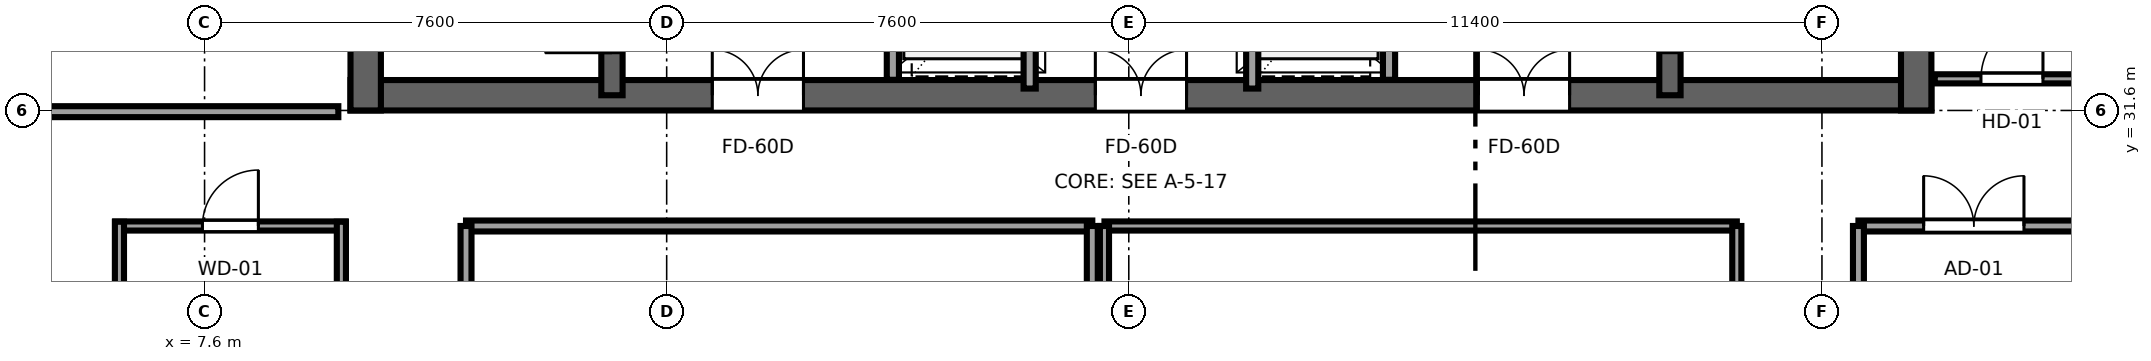
"""IFC4 building model, lengths in metres.
Left out: names, types, materials, properties, quantities, classifications, styles, units other than length and angle.
Written with IfcOpenShell. Run it as: python <this file> out.ifc"""

import sys

from ifc_helpers import new_model, si_unit, direction, frame, frame_2d, origin, place, context, subcontext, project, spatial, rectangle, extrude, source, transform, mapped, element, fill, save


model = new_model("IFC4")
c1 = context("Model", 3, precision=1e-05, world=origin(), true_north=direction((0.0, 1.0)))
c2 = subcontext(c1, "Body", "Model", "MODEL_VIEW")
j1 = project(units=[si_unit("LENGTHUNIT", "METRE"), si_unit("PLANEANGLEUNIT", "RADIAN")], contexts=[c1])
p1 = place(None, origin())
s1 = spatial("IfcSite", under=j1, at=p1, CompositionType="ELEMENT")
p2 = place(p1, origin())
s2 = spatial("IfcBuilding", under=s1, at=p2, CompositionType="ELEMENT")
p3 = place(p2, frame((0.0, 0.0, 245.2)))
s3 = spatial("IfcBuildingStorey", under=s2, at=p3, CompositionType="ELEMENT", Elevation=245.2)
p4 = place(p3, frame((10.0, 31.85, 0.0), z_axis=(0.0, 0.0, 1.0), x_axis=(1.0, 0.0, 0.0)))
e1 = element("IfcWall", 1, at=p4, inside=s3, PredefinedType="SHEAR", context=c2, shape_type="SweptSolid", body=[
    extrude(rectangle(XDim=26.0, YDim=0.5, at=frame_2d((13.0, 0.0))), origin(), (0.0, 0.0, 1.0), 3.55),
])
p5 = place(p4, frame((7.45, 0.0, 0.0), z_axis=(0.0, 0.0, 1.0), x_axis=(-1.0, 0.0, 0.0)))
e2 = element("IfcOpeningElement", 2, at=p5, cuts=e1, PredefinedType="OPENING", context=c2, shape_type="SweptSolid", body=[
    extrude(rectangle(XDim=1.5, YDim=2.04, at=frame_2d((0.75, 1.02))), frame((0.0, 0.26, 0.0), z_axis=(0.0, -1.0, 0.0), x_axis=(1.0, 0.0, 0.0)), (0.0, 0.0, 1.0), 0.52),
])
p6 = place(p4, frame((13.75, 0.0, 0.0), z_axis=(0.0, 0.0, 1.0), x_axis=(-1.0, 0.0, 0.0)))
e3 = element("IfcOpeningElement", 3, at=p6, cuts=e1, PredefinedType="OPENING", context=c2, shape_type="SweptSolid", body=[
    extrude(rectangle(XDim=1.5, YDim=2.04, at=frame_2d((0.75, 1.02))), frame((0.0, 0.26, 0.0), z_axis=(0.0, -1.0, 0.0), x_axis=(1.0, 0.0, 0.0)), (0.0, 0.0, 1.0), 0.52),
])
p7 = place(p4, frame((20.05, 0.0, 0.0), z_axis=(0.0, 0.0, 1.0), x_axis=(-1.0, 0.0, 0.0)))
e4 = element("IfcOpeningElement", 4, at=p7, cuts=e1, PredefinedType="OPENING", context=c2, shape_type="SweptSolid", body=[
    extrude(rectangle(XDim=1.5, YDim=2.04, at=frame_2d((0.75, 1.02))), frame((0.0, 0.26, 0.0), z_axis=(0.0, -1.0, 0.0), x_axis=(1.0, 0.0, 0.0)), (0.0, 0.0, 1.0), 0.52),
])
for number, where, z_axis, x_axis in (
    (5, (10.25, 31.6, 0.0), (0.0, 0.0, 1.0), (0.0, 1.0, 0.0)),
    (6, (35.75, 31.6, 0.0), (0.0, 0.0, 1.0), (0.0, 1.0, 0.0)),
):
    element("IfcWall", number, at=place(p3, frame(where, z_axis=z_axis, x_axis=x_axis)), inside=s3, PredefinedType="SHEAR", context=c2, shape_type="SweptSolid", body=[
        extrude(rectangle(XDim=13.6, YDim=0.5, at=frame_2d((6.8, 0.0))), origin(), (0.0, 0.0, 1.0), 3.55),
    ])
p8 = place(p3, frame((14.3, 31.85, 0.0), z_axis=(0.0, 0.0, 1.0), x_axis=(0.0, 1.0, 0.0)))
e7 = element("IfcWall", 7, at=p8, inside=s3, PredefinedType="SHEAR", context=c2, shape_type="SweptSolid", body=[
    extrude(rectangle(XDim=13.1, YDim=0.35, at=frame_2d((6.55, 0.0))), origin(), (0.0, 0.0, 1.0), 3.55),
])
p9 = place(p8, frame((0.7, 0.0, 0.0)))
e8 = element("IfcOpeningElement", 8, at=p9, cuts=e7, PredefinedType="OPENING", context=c2, shape_type="SweptSolid", body=[
    extrude(rectangle(XDim=1.1, YDim=2.12, at=frame_2d((0.55, 1.06))), frame((0.0, 0.185, 0.0), z_axis=(0.0, -1.0, 0.0), x_axis=(1.0, 0.0, 0.0)), (0.0, 0.0, 1.0), 0.37),
])
p10 = place(p3, frame((31.7, 31.85, 0.0), z_axis=(0.0, 0.0, 1.0), x_axis=(0.0, 1.0, 0.0)))
e9 = element("IfcWall", 9, at=p10, inside=s3, PredefinedType="SHEAR", context=c2, shape_type="SweptSolid", body=[
    extrude(rectangle(XDim=13.1, YDim=0.35, at=frame_2d((6.55, 0.0))), origin(), (0.0, 0.0, 1.0), 3.55),
])
p11 = place(p10, frame((1.8, 0.0, 0.0), z_axis=(0.0, 0.0, 1.0), x_axis=(-1.0, 0.0, 0.0)))
e10 = element("IfcOpeningElement", 10, at=p11, cuts=e9, PredefinedType="OPENING", context=c2, shape_type="SweptSolid", body=[
    extrude(rectangle(XDim=1.1, YDim=2.12, at=frame_2d((0.55, 1.06))), frame((0.0, 0.185, 0.0), z_axis=(0.0, -1.0, 0.0), x_axis=(1.0, 0.0, 0.0)), (0.0, 0.0, 1.0), 0.37),
])
for number, where, z_axis, x_axis in (
    (11, (18.92, 32.104, 0.0), (0.0, 0.0, 1.0), (0.0, 1.0, 0.0)),
    (12, (27.08, 32.104, 0.0), (0.0, 0.0, 1.0), (0.0, 1.0, 0.0)),
):
    element("IfcWall", number, at=place(p3, frame(where, z_axis=z_axis, x_axis=x_axis)), inside=s3, PredefinedType="SOLIDWALL", context=c2, shape_type="SweptSolid", body=[
        extrude(rectangle(XDim=4.046, YDim=0.2, at=frame_2d((2.023, 0.0))), origin(), (0.0, 0.0, 1.0), 3.37),
    ])
p12 = place(p3, frame((21.17, 31.96, 0.0), z_axis=(0.0, 0.0, 1.0), x_axis=(0.0, 1.0, 0.0)))
e13 = element("IfcWall", 13, at=p12, inside=s3, PredefinedType="SOLIDWALL", context=c2, shape_type="SweptSolid", body=[
    extrude(rectangle(XDim=5.08, YDim=0.2, at=frame_2d((2.54, 0.0))), origin(), (0.0, 0.0, 1.0), 3.37),
])
p13 = place(p12, frame((0.74, 0.0, 0.0)))
e14 = element("IfcOpeningElement", 14, at=p13, cuts=e13, PredefinedType="OPENING", context=c2, shape_type="SweptSolid", body=[
    extrude(rectangle(XDim=1.1, YDim=2.12, at=frame_2d((0.55, 1.06))), frame((0.0, 0.11, 0.0), z_axis=(0.0, -1.0, 0.0), x_axis=(1.0, 0.0, 0.0)), (0.0, 0.0, 1.0), 0.22),
])
p14 = place(p12, frame((3.24, 0.0, 0.0)))
e15 = element("IfcOpeningElement", 15, at=p14, cuts=e13, PredefinedType="OPENING", context=c2, shape_type="SweptSolid", body=[
    extrude(rectangle(XDim=1.1, YDim=2.12, at=frame_2d((0.55, 1.06))), frame((0.0, 0.11, 0.0), z_axis=(0.0, -1.0, 0.0), x_axis=(1.0, 0.0, 0.0)), (0.0, 0.0, 1.0), 0.22),
])
p15 = place(p3, frame((24.83, 31.96, 0.0), z_axis=(0.0, 0.0, 1.0), x_axis=(0.0, 1.0, 0.0)))
e16 = element("IfcWall", 16, at=p15, inside=s3, PredefinedType="SOLIDWALL", context=c2, shape_type="SweptSolid", body=[
    extrude(rectangle(XDim=5.08, YDim=0.2, at=frame_2d((2.54, 0.0))), origin(), (0.0, 0.0, 1.0), 3.37),
])
p16 = place(p15, frame((0.74, 0.0, 0.0)))
e17 = element("IfcOpeningElement", 17, at=p16, cuts=e16, PredefinedType="OPENING", context=c2, shape_type="SweptSolid", body=[
    extrude(rectangle(XDim=1.1, YDim=2.12, at=frame_2d((0.55, 1.06))), frame((0.0, 0.11, 0.0), z_axis=(0.0, -1.0, 0.0), x_axis=(1.0, 0.0, 0.0)), (0.0, 0.0, 1.0), 0.22),
])
p17 = place(p15, frame((3.24, 0.0, 0.0)))
e18 = element("IfcOpeningElement", 18, at=p17, cuts=e16, PredefinedType="OPENING", context=c2, shape_type="SweptSolid", body=[
    extrude(rectangle(XDim=1.1, YDim=2.12, at=frame_2d((0.55, 1.06))), frame((0.0, 0.11, 0.0), z_axis=(0.0, -1.0, 0.0), x_axis=(1.0, 0.0, 0.0)), (0.0, 0.0, 1.0), 0.22),
])
p18 = place(p3, frame((11.9, 29.7, 0.0), z_axis=(0.0, 0.0, 1.0), x_axis=(1.0, 0.0, 0.0)))
e19 = element("IfcWall", 19, at=p18, inside=s3, PredefinedType="PARTITIONING", context=c2, shape_type="SweptSolid", body=[
    extrude(rectangle(XDim=10.3, YDim=0.18, at=frame_2d((5.15, 0.0))), origin(), (0.0, 0.0, 1.0), 3.37),
])
p19 = place(p3, frame((11.9, 21.55, 0.0), z_axis=(0.0, 0.0, 1.0), x_axis=(0.0, 1.0, 0.0)))
e20 = element("IfcWall", 20, at=p19, inside=s3, PredefinedType="PARTITIONING", context=c2, shape_type="SweptSolid", body=[
    extrude(rectangle(XDim=8.15, YDim=0.18, at=frame_2d((4.075, 0.0))), origin(), (0.0, 0.0, 1.0), 3.37),
])
p20 = place(p3, frame((22.2, 21.55, 0.0), z_axis=(0.0, 0.0, 1.0), x_axis=(0.0, 1.0, 0.0)))
e21 = element("IfcWall", 21, at=p20, inside=s3, PredefinedType="PARTITIONING", context=c2, shape_type="SweptSolid", body=[
    extrude(rectangle(XDim=8.15, YDim=0.18, at=frame_2d((4.075, 0.0))), origin(), (0.0, 0.0, 1.0), 2.827),
])
p21 = place(p3, frame((22.4, 29.7, 0.0), z_axis=(0.0, 0.0, 1.0), x_axis=(1.0, 0.0, 0.0)))
e22 = element("IfcWall", 22, at=p21, inside=s3, PredefinedType="PARTITIONING", context=c2, shape_type="SweptSolid", body=[
    extrude(rectangle(XDim=10.4, YDim=0.15, at=frame_2d((5.2, 0.0))), origin(), (0.0, 0.0, 1.0), 3.37),
])
p22 = place(p3, frame((22.4, 21.55, 0.0), z_axis=(0.0, 0.0, 1.0), x_axis=(0.0, 1.0, 0.0)))
e23 = element("IfcWall", 23, at=p22, inside=s3, PredefinedType="PARTITIONING", context=c2, shape_type="SweptSolid", body=[
    extrude(rectangle(XDim=8.15, YDim=0.15, at=frame_2d((4.075, 0.0))), origin(), (0.0, 0.0, 1.0), 3.37),
])
p23 = place(p3, frame((32.8, 21.55, 0.0), z_axis=(0.0, 0.0, 1.0), x_axis=(0.0, 1.0, 0.0)))
e24 = element("IfcWall", 24, at=p23, inside=s3, PredefinedType="PARTITIONING", context=c2, shape_type="SweptSolid", body=[
    extrude(rectangle(XDim=8.15, YDim=0.15, at=frame_2d((4.075, 0.0))), origin(), (0.0, 0.0, 1.0), 2.827),
])
p24 = place(p3, frame((6.13, 29.7, 0.0), z_axis=(0.0, 0.0, 1.0), x_axis=(1.0, 0.0, 0.0)))
e25 = element("IfcWall", 25, at=p24, inside=s3, PredefinedType="PARTITIONING", context=c2, shape_type="SweptSolid", body=[
    extrude(rectangle(XDim=3.79, YDim=0.15, at=frame_2d((1.895, 0.0))), origin(), (0.0, 0.0, 1.0), 3.37),
])
p25 = place(p24, frame((1.435, 0.0, 0.0)))
e26 = element("IfcOpeningElement", 26, at=p25, cuts=e25, PredefinedType="OPENING", context=c2, shape_type="SweptSolid", body=[
    extrude(rectangle(XDim=0.92, YDim=2.01, at=frame_2d((0.46, 1.005))), frame((0.0, 0.085, 0.0), z_axis=(0.0, -1.0, 0.0), x_axis=(1.0, 0.0, 0.0)), (0.0, 0.0, 1.0), 0.17),
])
for number, where, z_axis, x_axis in (
    (27, (6.2, 26.43, 0.0), (0.0, 0.0, 1.0), (0.0, 1.0, 0.0)),
    (28, (9.85, 26.43, 0.0), (0.0, 0.0, 1.0), (0.0, 1.0, 0.0)),
):
    element("IfcWall", number, at=place(p3, frame(where, z_axis=z_axis, x_axis=x_axis)), inside=s3, PredefinedType="PARTITIONING", context=c2, shape_type="SweptSolid", body=[
        extrude(rectangle(XDim=3.34, YDim=0.15, at=frame_2d((1.67, 0.0))), origin(), (0.0, 0.0, 1.0), 3.37),
    ])
p26 = place(p3, frame((3.005, 31.58, 0.0), z_axis=(0.0, 0.0, 1.0), x_axis=(1.0, 0.0, 0.0)))
e29 = element("IfcWall", 29, at=p26, inside=s3, PredefinedType="PARTITIONING", context=c2, shape_type="SweptSolid", body=[
    extrude(rectangle(XDim=6.795, YDim=0.18, at=frame_2d((3.397, 0.0))), origin(), (0.0, 0.0, 1.0), 3.37),
])
p27 = place(p26, frame((0.285, 0.0, 0.0)))
e30 = element("IfcOpeningElement", 30, at=p27, cuts=e29, PredefinedType="OPENING", context=c2, shape_type="SweptSolid", body=[
    extrude(rectangle(XDim=0.98, YDim=2.12, at=frame_2d((0.49, 1.06))), frame((0.0, 0.1, 0.0), z_axis=(0.0, -1.0, 0.0), x_axis=(1.0, 0.0, 0.0)), (0.0, 0.0, 1.0), 0.2),
])
p28 = place(p3, frame((36.055, 32.12, 0.0), z_axis=(0.0, 0.0, 1.0), x_axis=(1.0, 0.0, 0.0)))
e31 = element("IfcWall", 31, at=p28, inside=s3, PredefinedType="PARTITIONING", context=c2, shape_type="SweptSolid", body=[
    extrude(rectangle(XDim=2.54, YDim=0.15, at=frame_2d((1.27, 0.0))), origin(), (0.0, 0.0, 1.0), 3.37),
])
p29 = place(p28, frame((0.76, 0.0, 0.0)))
e32 = element("IfcOpeningElement", 32, at=p29, cuts=e31, PredefinedType="OPENING", context=c2, shape_type="SweptSolid", body=[
    extrude(rectangle(XDim=1.02, YDim=2.03, at=frame_2d((0.51, 1.015))), frame((0.0, 0.085, 0.0), z_axis=(0.0, -1.0, 0.0), x_axis=(1.0, 0.0, 0.0)), (0.0, 0.0, 1.0), 0.17),
])
p30 = place(p3, frame((34.8, 29.7, 0.0), z_axis=(0.0, 0.0, 1.0), x_axis=(1.0, 0.0, 0.0)))
e33 = element("IfcWall", 33, at=p30, inside=s3, PredefinedType="PARTITIONING", context=c2, shape_type="SweptSolid", body=[
    extrude(rectangle(XDim=3.795, YDim=0.18, at=frame_2d((1.897, 0.0))), origin(), (0.0, 0.0, 1.0), 3.37),
])
p31 = place(p30, frame((1.073, 0.0, 0.0)))
e34 = element("IfcOpeningElement", 34, at=p31, cuts=e33, PredefinedType="OPENING", context=c2, shape_type="SweptSolid", body=[
    extrude(rectangle(XDim=1.65, YDim=2.15, at=frame_2d((0.825, 1.075))), frame((0.0, 0.1, 0.0), z_axis=(0.0, -1.0, 0.0), x_axis=(1.0, 0.0, 0.0)), (0.0, 0.0, 1.0), 0.2),
])
p32 = place(p3, frame((34.8, 21.9, 0.0), z_axis=(0.0, 0.0, 1.0), x_axis=(0.0, 1.0, 0.0)))
e35 = element("IfcWall", 35, at=p32, inside=s3, PredefinedType="PARTITIONING", context=c2, shape_type="SweptSolid", body=[
    extrude(rectangle(XDim=7.8, YDim=0.18, at=frame_2d((3.9, 0.0))), origin(), (0.0, 0.0, 1.0), 2.827),
])
m1 = source(origin(), c2, "Body", "SweptSolid", [
    extrude(rectangle(XDim=1.1, YDim=2.12, at=frame_2d((0.55, 1.06))), frame((0.0, 0.025, 0.0), z_axis=(0.0, -1.0, 0.0), x_axis=(1.0, 0.0, 0.0)), (0.0, 0.0, 1.0), 0.05),
])
p33 = place(p9, origin())
e36 = element("IfcDoor", 36, at=p33, inside=s3, OperationType="SINGLE_SWING_LEFT", PredefinedType="DOOR", context=c2, shape_type="MappedRepresentation", body=[
    mapped(m1, transform((0.0, 0.0, 0.0), x_axis=(1.0, 0.0, 0.0), y_axis=(0.0, 1.0, 0.0), z_axis=(0.0, 0.0, 1.0), scale=1.0)),
])
fill(e8, e36)
p34 = place(p11, origin())
e37 = element("IfcDoor", 37, at=p34, inside=s3, OperationType="SINGLE_SWING_RIGHT", PredefinedType="DOOR", context=c2, shape_type="MappedRepresentation", body=[
    mapped(m1, transform((0.0, 0.0, 0.0), x_axis=(1.0, 0.0, 0.0), y_axis=(0.0, 1.0, 0.0), z_axis=(0.0, 0.0, 1.0), scale=1.0)),
])
fill(e10, e37)
m2 = source(origin(), c2, "Body", "SweptSolid", [
    extrude(rectangle(XDim=1.5, YDim=2.04, at=frame_2d((0.75, 1.02))), frame((0.0, 0.025, 0.0), z_axis=(0.0, -1.0, 0.0), x_axis=(1.0, 0.0, 0.0)), (0.0, 0.0, 1.0), 0.05),
])
p35 = place(p5, origin())
e38 = element("IfcDoor", 38, at=p35, inside=s3, OperationType="DOUBLE_DOOR_SINGLE_SWING", PredefinedType="DOOR", context=c2, shape_type="MappedRepresentation", body=[
    mapped(m2, transform((0.0, 0.0, 0.0), x_axis=(1.0, 0.0, 0.0), y_axis=(0.0, 1.0, 0.0), z_axis=(0.0, 0.0, 1.0), scale=1.0)),
])
fill(e2, e38)
p36 = place(p6, origin())
e39 = element("IfcDoor", 39, at=p36, inside=s3, OperationType="DOUBLE_DOOR_SINGLE_SWING", PredefinedType="DOOR", context=c2, shape_type="MappedRepresentation", body=[
    mapped(m2, transform((0.0, 0.0, 0.0), x_axis=(1.0, 0.0, 0.0), y_axis=(0.0, 1.0, 0.0), z_axis=(0.0, 0.0, 1.0), scale=1.0)),
])
fill(e3, e39)
p37 = place(p7, origin())
e40 = element("IfcDoor", 40, at=p37, inside=s3, OperationType="DOUBLE_DOOR_SINGLE_SWING", PredefinedType="DOOR", context=c2, shape_type="MappedRepresentation", body=[
    mapped(m2, transform((0.0, 0.0, 0.0), x_axis=(1.0, 0.0, 0.0), y_axis=(0.0, 1.0, 0.0), z_axis=(0.0, 0.0, 1.0), scale=1.0)),
])
fill(e4, e40)
m3 = source(origin(), c2, "Body", "SweptSolid", [
    extrude(rectangle(XDim=0.92, YDim=2.01, at=frame_2d((0.46, 1.005))), frame((0.0, 0.025, 0.0), z_axis=(0.0, -1.0, 0.0), x_axis=(1.0, 0.0, 0.0)), (0.0, 0.0, 1.0), 0.05),
])
p38 = place(p25, origin())
e41 = element("IfcDoor", 41, at=p38, inside=s3, OperationType="SINGLE_SWING_RIGHT", PredefinedType="DOOR", context=c2, shape_type="MappedRepresentation", body=[
    mapped(m3, transform((0.0, 0.0, 0.0), x_axis=(1.0, 0.0, 0.0), y_axis=(0.0, 1.0, 0.0), z_axis=(0.0, 0.0, 1.0), scale=1.0)),
])
fill(e26, e41)
m4 = source(origin(), c2, "Body", "SweptSolid", [
    extrude(rectangle(XDim=1.02, YDim=2.03, at=frame_2d((0.51, 1.015))), frame((0.0, 0.025, 0.0), z_axis=(0.0, -1.0, 0.0), x_axis=(1.0, 0.0, 0.0)), (0.0, 0.0, 1.0), 0.05),
])
p39 = place(p29, origin())
e42 = element("IfcDoor", 42, at=p39, inside=s3, OperationType="SINGLE_SWING_RIGHT", PredefinedType="DOOR", context=c2, shape_type="MappedRepresentation", body=[
    mapped(m4, transform((0.0, 0.0, 0.0), x_axis=(1.0, 0.0, 0.0), y_axis=(0.0, 1.0, 0.0), z_axis=(0.0, 0.0, 1.0), scale=1.0)),
])
fill(e32, e42)
m5 = source(origin(), c2, "Body", "SweptSolid", [
    extrude(rectangle(XDim=1.65, YDim=2.15, at=frame_2d((0.825, 1.075))), frame((0.0, 0.025, 0.0), z_axis=(0.0, -1.0, 0.0), x_axis=(1.0, 0.0, 0.0)), (0.0, 0.0, 1.0), 0.05),
])
p40 = place(p31, origin())
e43 = element("IfcDoor", 43, at=p40, inside=s3, OperationType="DOUBLE_DOOR_SINGLE_SWING", PredefinedType="DOOR", context=c2, shape_type="MappedRepresentation", body=[
    mapped(m5, transform((0.0, 0.0, 0.0), x_axis=(1.0, 0.0, 0.0), y_axis=(0.0, 1.0, 0.0), z_axis=(0.0, 0.0, 1.0), scale=1.0)),
])
fill(e34, e43)
save(model, sys.argv[1])
